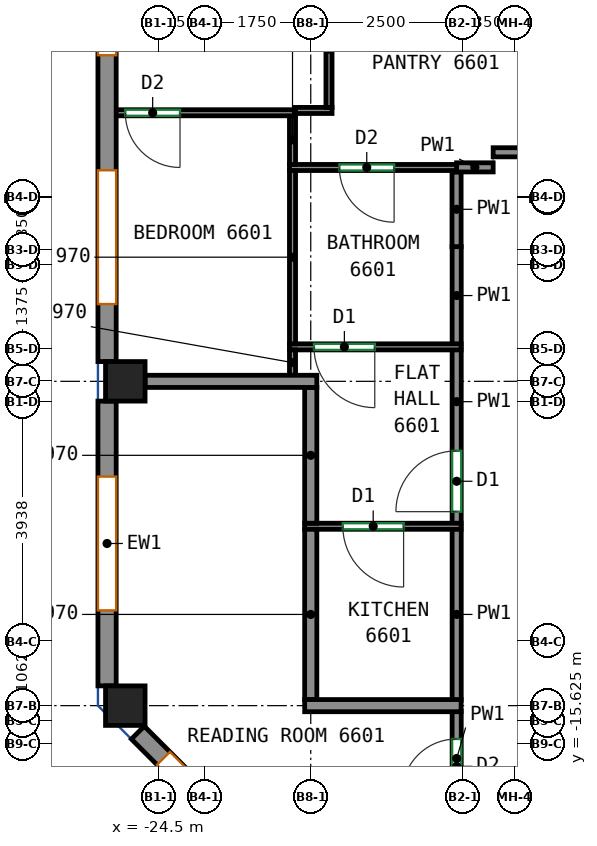
"""IFC4 building model, lengths in metres.
Left out: names, types, materials, properties, quantities, classifications, styles, units other than length and angle.
Written with IfcOpenShell. Run it as: python <this file> out.ifc"""

import sys

from ifc_helpers import new_model, si_unit, direction, frame, frame_2d, origin, origin_2d, place, context, subcontext, project, spatial, rectangle, extrude, source, transform, mapped, element, fill, save


model = new_model("IFC4")
c1 = context("Model", 3, precision=1e-05, world=origin(), true_north=direction((0.0, 1.0)))
c2 = subcontext(c1, "Body", "Model", "MODEL_VIEW")
j1 = project(units=[si_unit("LENGTHUNIT", "METRE"), si_unit("PLANEANGLEUNIT", "RADIAN")], contexts=[c1])
p1 = place(None, origin())
s1 = spatial("IfcSite", under=j1, at=p1, CompositionType="ELEMENT")
p2 = place(p1, origin())
s2 = spatial("IfcBuilding", under=s1, at=p2, CompositionType="ELEMENT")
p3 = place(p2, frame((0.0, 0.0, 270.4)))
s3 = spatial("IfcBuildingStorey", under=s2, at=p3, CompositionType="ELEMENT", Elevation=270.4)
m1 = source(origin(), c2, "Body", "SweptSolid", [
    extrude(rectangle(XDim=0.65, YDim=0.65, at=origin_2d()), origin(), (0.0, 0.0, 1.0), 3.12),
])
for number, where, z_axis, x_axis in (
    (1, (-25.05, -15.0, 0.0), (0.0, 0.0, 1.0), (1.0, 0.0, 0.0)),
    (2, (-25.05, -9.667, 0.0), (0.0, 0.0, 1.0), (1.0, 0.0, 0.0)),
):
    element("IfcColumn", number, at=place(p3, frame(where, z_axis=z_axis, x_axis=x_axis)), inside=s3, PredefinedType="COLUMN", context=c2, shape_type="MappedRepresentation", body=[
        mapped(m1, transform((0.0, 0.0, 0.0))),
    ])
m2 = source(origin(), c2, "Body", "SweptSolid", [
    extrude(rectangle(XDim=8.184, YDim=0.3, at=frame_2d((4.092, 0.0))), origin(), (0.0, 0.0, 1.0), 3.12),
])
p4 = place(p3, frame((-25.35, -1.158, 0.0), z_axis=(0.0, 0.0, 1.0), x_axis=(0.0, -1.0, 0.0)))
e3 = element("IfcWall", 3, at=p4, inside=s3, PredefinedType="SOLIDWALL", context=c2, shape_type="MappedRepresentation", body=[
    mapped(m2, transform((0.0, 0.0, 0.0))),
])
p5 = place(p4, frame((0.946, 0.0, 0.8)))
e4 = element("IfcOpeningElement", 4, at=p5, cuts=e3, PredefinedType="OPENING", context=c2, shape_type="SweptSolid", body=[
    extrude(rectangle(XDim=2.2, YDim=2.05, at=frame_2d((1.1, 1.025))), frame((0.0, 0.16, 0.0), z_axis=(0.0, -1.0, 0.0), x_axis=(1.0, 0.0, 0.0)), (0.0, 0.0, 1.0), 0.32),
])
p6 = place(p4, frame((5.038, 0.0, 0.8)))
e5 = element("IfcOpeningElement", 5, at=p6, cuts=e3, PredefinedType="OPENING", context=c2, shape_type="SweptSolid", body=[
    extrude(rectangle(XDim=2.2, YDim=2.05, at=frame_2d((1.1, 1.025))), frame((0.0, 0.16, 0.0), z_axis=(0.0, -1.0, 0.0), x_axis=(1.0, 0.0, 0.0)), (0.0, 0.0, 1.0), 0.32),
])
m3 = source(origin(), c2, "Body", "SweptSolid", [
    extrude(rectangle(XDim=4.683, YDim=0.3, at=frame_2d((2.342, 0.0))), origin(), (0.0, 0.0, 1.0), 3.12),
])
p7 = place(p3, frame((-25.35, -9.992, 0.0), z_axis=(0.0, 0.0, 1.0), x_axis=(0.0, -1.0, 0.0)))
e6 = element("IfcWall", 6, at=p7, inside=s3, PredefinedType="SOLIDWALL", context=c2, shape_type="MappedRepresentation", body=[
    mapped(m3, transform((0.0, 0.0, 0.0))),
])
p8 = place(p7, frame((1.242, 0.0, 0.8)))
e7 = element("IfcOpeningElement", 7, at=p8, cuts=e6, PredefinedType="OPENING", context=c2, shape_type="SweptSolid", body=[
    extrude(rectangle(XDim=2.2, YDim=2.05, at=frame_2d((1.1, 1.025))), frame((0.0, 0.16, 0.0), z_axis=(0.0, -1.0, 0.0), x_axis=(1.0, 0.0, 0.0)), (0.0, 0.0, 1.0), 0.32),
])
m4 = source(origin(), c2, "Body", "SweptSolid", [
    extrude(rectangle(XDim=3.394, YDim=0.3, at=frame_2d((1.697, 0.0))), origin(), (0.0, 0.0, 1.0), 3.12),
])
p9 = place(p3, frame((-24.844, -15.444, 0.0), z_axis=(0.0, 0.0, 1.0), x_axis=(0.707070815327, -0.707142745217, 0.0)))
e8 = element("IfcWall", 8, at=p9, inside=s3, PredefinedType="SOLIDWALL", context=c2, shape_type="MappedRepresentation", body=[
    mapped(m4, transform((0.0, 0.0, 0.0))),
])
p10 = place(p9, frame((0.597, 0.0, 0.8)))
e9 = element("IfcOpeningElement", 9, at=p10, cuts=e8, PredefinedType="OPENING", context=c2, shape_type="SweptSolid", body=[
    extrude(rectangle(XDim=2.2, YDim=2.05, at=frame_2d((1.1, 1.025))), frame((0.0, 0.16, 0.0), z_axis=(0.0, -1.0, 0.0), x_axis=(1.0, 0.0, 0.0)), (0.0, 0.0, 1.0), 0.32),
])
p11 = place(p3, frame((-19.6, -14.91, 0.0), z_axis=(0.0, 0.0, 1.0), x_axis=(0.0, 1.0, 0.0)))
e10 = element("IfcWall", 10, at=p11, inside=s3, PredefinedType="PARTITIONING", context=c2, shape_type="SweptSolid", body=[
    extrude(rectangle(XDim=2.82, YDim=0.15, at=frame_2d((1.41, 0.0))), origin(), (0.0, 0.0, 1.0), 3.12),
])
p12 = place(p3, frame((-19.6, -12.01, 0.0), z_axis=(0.0, 0.0, 1.0), x_axis=(0.0, 1.0, 0.0)))
e11 = element("IfcWall", 11, at=p12, inside=s3, PredefinedType="PARTITIONING", context=c2, shape_type="SweptSolid", body=[
    extrude(rectangle(XDim=2.87, YDim=0.15, at=frame_2d((1.435, 0.0))), origin(), (0.0, 0.0, 1.0), 3.12),
])
p13 = place(p12, frame((0.2, 0.0, 0.0)))
e12 = element("IfcOpeningElement", 12, at=p13, cuts=e11, PredefinedType="OPENING", context=c2, shape_type="SweptSolid", body=[
    extrude(rectangle(XDim=1.0, YDim=2.1, at=frame_2d((0.5, 1.05))), frame((0.0, 0.085, 0.0), z_axis=(0.0, -1.0, 0.0), x_axis=(1.0, 0.0, 0.0)), (0.0, 0.0, 1.0), 0.17),
])
p14 = place(p3, frame((-19.6, -9.06, 0.0), z_axis=(0.0, 0.0, 1.0), x_axis=(0.0, 1.0, 0.0)))
e13 = element("IfcWall", 13, at=p14, inside=s3, PredefinedType="PARTITIONING", context=c2, shape_type="SweptSolid", body=[
    extrude(rectangle(XDim=1.608, YDim=0.15, at=frame_2d((0.804, 0.0))), origin(), (0.0, 0.0, 1.0), 3.12),
])
p15 = place(p3, frame((-19.602, -7.452, 0.0), z_axis=(0.0, 0.0, 1.0), x_axis=(0.0, 1.0, 0.0)))
e14 = element("IfcWall", 14, at=p15, inside=s3, PredefinedType="PARTITIONING", context=c2, shape_type="SweptSolid", body=[
    extrude(rectangle(XDim=1.229, YDim=0.15, at=frame_2d((0.615, 0.0))), origin(), (0.0, 0.0, 1.0), 3.12),
])
p16 = place(p3, frame((-19.0, -6.148, 0.0), z_axis=(0.0, 0.0, 1.0), x_axis=(-1.0, 0.0, 0.0)))
e15 = element("IfcWall", 15, at=p16, inside=s3, PredefinedType="PARTITIONING", context=c2, shape_type="SweptSolid", body=[
    extrude(rectangle(XDim=0.602, YDim=0.15, at=frame_2d((0.301, 0.0))), origin(), (0.0, 0.0, 1.0), 3.12),
])
p17 = place(p3, frame((-19.0, -5.9, 0.0), z_axis=(0.0, 0.0, 1.0), x_axis=(1.0, 0.0, 0.0)))
e16 = element("IfcWall", 16, at=p17, inside=s3, PredefinedType="PARTITIONING", context=c2, shape_type="SweptSolid", body=[
    extrude(rectangle(XDim=25.655, YDim=0.15, at=frame_2d((12.828, 0.0))), origin(), (0.0, 0.0, 1.0), 3.12),
])
p18 = place(p17, frame((4.796, 0.0, 0.0)))
e17 = element("IfcOpeningElement", 17, at=p18, cuts=e16, PredefinedType="OPENING", context=c2, shape_type="SweptSolid", body=[
    extrude(rectangle(XDim=0.9, YDim=2.1, at=frame_2d((0.45, 1.05))), frame((0.0, 0.085, 0.0), z_axis=(0.0, -1.0, 0.0), x_axis=(1.0, 0.0, 0.0)), (0.0, 0.0, 1.0), 0.17),
])
p19 = place(p17, frame((21.535, 0.0, 0.0)))
e18 = element("IfcOpeningElement", 18, at=p19, cuts=e16, PredefinedType="OPENING", context=c2, shape_type="SweptSolid", body=[
    extrude(rectangle(XDim=0.9, YDim=2.1, at=frame_2d((0.45, 1.05))), frame((0.0, 0.085, 0.0), z_axis=(0.0, -1.0, 0.0), x_axis=(1.0, 0.0, 0.0)), (0.0, 0.0, 1.0), 0.17),
])
p20 = place(p3, frame((-19.6, -16.648, 0.0), z_axis=(0.0, 0.0, 1.0), x_axis=(0.0, 1.0, 0.0)))
e19 = element("IfcWall", 19, at=p20, inside=s3, PredefinedType="PARTITIONING", context=c2, shape_type="SweptSolid", body=[
    extrude(rectangle(XDim=1.558, YDim=0.15, at=frame_2d((0.779, 0.0))), origin(), (0.0, 0.0, 1.0), 3.12),
])
p21 = place(p20, frame((0.2, 0.0, 0.0)))
e20 = element("IfcOpeningElement", 20, at=p21, cuts=e19, PredefinedType="OPENING", context=c2, shape_type="SweptSolid", body=[
    extrude(rectangle(XDim=0.9, YDim=2.1, at=frame_2d((0.45, 1.05))), frame((0.0, 0.085, 0.0), z_axis=(0.0, -1.0, 0.0), x_axis=(1.0, 0.0, 0.0)), (0.0, 0.0, 1.0), 0.17),
])
p22 = place(p3, frame((-19.527, -12.05, 0.0), z_axis=(0.0, 0.0, 1.0), x_axis=(-1.0, 0.0, 0.0)))
e21 = element("IfcWall", 21, at=p22, inside=s3, PredefinedType="PARTITIONING", context=c2, shape_type="SweptSolid", body=[
    extrude(rectangle(XDim=2.573, YDim=0.1, at=frame_2d((1.287, 0.0))), origin(), (0.0, 0.0, 1.0), 3.12),
])
p23 = place(p22, frame((0.946, 0.0, 0.0)))
e22 = element("IfcOpeningElement", 22, at=p23, cuts=e21, PredefinedType="OPENING", context=c2, shape_type="SweptSolid", body=[
    extrude(rectangle(XDim=1.0, YDim=2.1, at=frame_2d((0.5, 1.05))), frame((0.0, 0.06, 0.0), z_axis=(0.0, -1.0, 0.0), x_axis=(1.0, 0.0, 0.0)), (0.0, 0.0, 1.0), 0.12),
])
p24 = place(p3, frame((-22.0, -14.9, 0.0), z_axis=(0.0, 0.0, 1.0), x_axis=(0.0, 1.0, 0.0)))
e23 = element("IfcWall", 23, at=p24, inside=s3, PredefinedType="PARTITIONING", context=c2, shape_type="SweptSolid", body=[
    extrude(rectangle(XDim=2.8, YDim=0.2, at=frame_2d((1.4, 0.0))), origin(), (0.0, 0.0, 1.0), 2.57),
])
p25 = place(p3, frame((-22.1, -15.0, 0.0), z_axis=(0.0, 0.0, 1.0), x_axis=(1.0, 0.0, 0.0)))
e24 = element("IfcWall", 24, at=p25, inside=s3, PredefinedType="PARTITIONING", context=c2, shape_type="SweptSolid", body=[
    extrude(rectangle(XDim=2.573, YDim=0.2, at=frame_2d((1.287, 0.0))), origin(), (0.0, 0.0, 1.0), 3.12),
])
p26 = place(p3, frame((-19.527, -9.1, 0.0), z_axis=(0.0, 0.0, 1.0), x_axis=(-1.0, 0.0, 0.0)))
e25 = element("IfcWall", 25, at=p26, inside=s3, PredefinedType="PARTITIONING", context=c2, shape_type="SweptSolid", body=[
    extrude(rectangle(XDim=2.823, YDim=0.1, at=frame_2d((1.412, 0.0))), origin(), (0.0, 0.0, 1.0), 3.12),
])
p27 = place(p26, frame((1.42, 0.0, 0.0)))
e26 = element("IfcOpeningElement", 26, at=p27, cuts=e25, PredefinedType="OPENING", context=c2, shape_type="SweptSolid", body=[
    extrude(rectangle(XDim=1.0, YDim=2.1, at=frame_2d((0.5, 1.05))), frame((0.0, 0.06, 0.0), z_axis=(0.0, -1.0, 0.0), x_axis=(1.0, 0.0, 0.0)), (0.0, 0.0, 1.0), 0.12),
])
p28 = place(p3, frame((-22.3, -9.567, 0.0), z_axis=(0.0, 0.0, 1.0), x_axis=(0.0, 1.0, 0.0)))
e27 = element("IfcWall", 27, at=p28, inside=s3, PredefinedType="PARTITIONING", context=c2, shape_type="SweptSolid", body=[
    extrude(rectangle(XDim=0.417, YDim=0.1, at=frame_2d((0.208, 0.0))), origin(), (0.0, 0.0, 1.0), 2.57),
])
p29 = place(p3, frame((-22.0, -12.0, 0.0), z_axis=(0.0, 0.0, 1.0), x_axis=(0.0, 1.0, 0.0)))
e28 = element("IfcWall", 28, at=p29, inside=s3, PredefinedType="PARTITIONING", context=c2, shape_type="SweptSolid", body=[
    extrude(rectangle(XDim=2.233, YDim=0.2, at=frame_2d((1.116, 0.0))), origin(), (0.0, 0.0, 1.0), 2.57),
])
p30 = place(p3, frame((-19.602, -6.15, 0.0), z_axis=(0.0, 0.0, 1.0), x_axis=(-1.0, 0.0, 0.0)))
e29 = element("IfcWall", 29, at=p30, inside=s3, PredefinedType="PARTITIONING", context=c2, shape_type="SweptSolid", body=[
    extrude(rectangle(XDim=2.748, YDim=0.1, at=frame_2d((1.374, 0.0))), origin(), (0.0, 0.0, 1.0), 3.12),
])
p31 = place(p30, frame((1.027, 0.0, 0.0)))
e30 = element("IfcOpeningElement", 30, at=p31, cuts=e29, PredefinedType="OPENING", context=c2, shape_type="SweptSolid", body=[
    extrude(rectangle(XDim=0.9, YDim=2.1, at=frame_2d((0.45, 1.05))), frame((0.0, 0.06, 0.0), z_axis=(0.0, -1.0, 0.0), x_axis=(1.0, 0.0, 0.0)), (0.0, 0.0, 1.0), 0.12),
])
p32 = place(p3, frame((-22.3, -9.05, 0.0), z_axis=(0.0, 0.0, 1.0), x_axis=(0.0, 1.0, 0.0)))
e31 = element("IfcWall", 31, at=p32, inside=s3, PredefinedType="PARTITIONING", context=c2, shape_type="SweptSolid", body=[
    extrude(rectangle(XDim=2.85, YDim=0.1, at=frame_2d((1.425, 0.0))), origin(), (0.0, 0.0, 1.0), 2.57),
])
p33 = place(p3, frame((-22.3, -6.1, 0.0), z_axis=(0.0, 0.0, 1.0), x_axis=(0.0, 1.0, 0.0)))
e32 = element("IfcWall", 32, at=p33, inside=s3, PredefinedType="PARTITIONING", context=c2, shape_type="SweptSolid", body=[
    extrude(rectangle(XDim=0.81, YDim=0.1, at=frame_2d((0.405, 0.0))), origin(), (0.0, 0.0, 1.0), 2.57),
])
p34 = place(p3, frame((-21.65, -5.212, 0.0), z_axis=(0.0, 0.0, 1.0), x_axis=(-1.0, 0.0, 0.0)))
e33 = element("IfcWall", 33, at=p34, inside=s3, PredefinedType="PARTITIONING", context=c2, shape_type="SweptSolid", body=[
    extrude(rectangle(XDim=0.602, YDim=0.1, at=frame_2d((0.301, 0.0))), origin(), (0.0, 0.0, 1.0), 3.12),
])
p35 = place(p3, frame((-21.7, -5.162, 0.0), z_axis=(0.0, 0.0, 1.0), x_axis=(0.0, 1.0, 0.0)))
e34 = element("IfcWall", 34, at=p35, inside=s3, PredefinedType="PARTITIONING", context=c2, shape_type="SweptSolid", body=[
    extrude(rectangle(XDim=1.912, YDim=0.1, at=frame_2d((0.956, 0.0))), origin(), (0.0, 0.0, 1.0), 2.57),
])
p36 = place(p3, frame((-22.252, -5.25, 0.0), z_axis=(0.0, 0.0, 1.0), x_axis=(-1.0, 0.0, 0.0)))
e35 = element("IfcWall", 35, at=p36, inside=s3, PredefinedType="PARTITIONING", context=c2, shape_type="SweptSolid", body=[
    extrude(rectangle(XDim=2.998, YDim=0.1, at=frame_2d((1.499, 0.0))), origin(), (0.0, 0.0, 1.0), 3.12),
])
p37 = place(p36, frame((1.898, 0.0, 0.0)))
e36 = element("IfcOpeningElement", 36, at=p37, cuts=e35, PredefinedType="OPENING", context=c2, shape_type="SweptSolid", body=[
    extrude(rectangle(XDim=0.9, YDim=2.1, at=frame_2d((0.45, 1.05))), frame((0.0, 0.06, 0.0), z_axis=(0.0, -1.0, 0.0), x_axis=(1.0, 0.0, 0.0)), (0.0, 0.0, 1.0), 0.12),
])
p38 = place(p3, frame((-24.725, -9.667, 0.0), z_axis=(0.0, 0.0, 1.0), x_axis=(1.0, 0.0, 0.0)))
e37 = element("IfcWall", 37, at=p38, inside=s3, PredefinedType="PARTITIONING", context=c2, shape_type="SweptSolid", body=[
    extrude(rectangle(XDim=2.825, YDim=0.2, at=frame_2d((1.413, 0.0))), origin(), (0.0, 0.0, 1.0), 3.12),
])
p39 = place(p5, origin())
e38 = element("IfcWindow", 38, at=p39, inside=s3, PartitioningType="SINGLE_PANEL", PredefinedType="WINDOW", context=c2, shape_type="SweptSolid", body=[
    extrude(rectangle(XDim=2.2, YDim=2.05, at=frame_2d((1.1, 1.025))), frame((0.0, 0.03, 0.0), z_axis=(0.0, -1.0, 0.0), x_axis=(1.0, 0.0, 0.0)), (0.0, 0.0, 1.0), 0.06),
])
fill(e4, e38)
p40 = place(p6, origin())
e39 = element("IfcWindow", 39, at=p40, inside=s3, PartitioningType="SINGLE_PANEL", PredefinedType="WINDOW", context=c2, shape_type="SweptSolid", body=[
    extrude(rectangle(XDim=2.2, YDim=2.05, at=frame_2d((1.1, 1.025))), frame((0.0, 0.03, 0.0), z_axis=(0.0, -1.0, 0.0), x_axis=(1.0, 0.0, 0.0)), (0.0, 0.0, 1.0), 0.06),
])
fill(e5, e39)
p41 = place(p8, origin())
e40 = element("IfcWindow", 40, at=p41, inside=s3, PartitioningType="SINGLE_PANEL", PredefinedType="WINDOW", context=c2, shape_type="SweptSolid", body=[
    extrude(rectangle(XDim=2.2, YDim=2.05, at=frame_2d((1.1, 1.025))), frame((0.0, 0.03, 0.0), z_axis=(0.0, -1.0, 0.0), x_axis=(1.0, 0.0, 0.0)), (0.0, 0.0, 1.0), 0.06),
])
fill(e7, e40)
p42 = place(p10, origin())
e41 = element("IfcWindow", 41, at=p42, inside=s3, PartitioningType="SINGLE_PANEL", PredefinedType="WINDOW", context=c2, shape_type="SweptSolid", body=[
    extrude(rectangle(XDim=2.2, YDim=2.05, at=frame_2d((1.1, 1.025))), frame((0.0, 0.03, 0.0), z_axis=(0.0, -1.0, 0.0), x_axis=(1.0, 0.0, 0.0)), (0.0, 0.0, 1.0), 0.06),
])
fill(e9, e41)
p43 = place(p21, origin())
e42 = element("IfcDoor", 42, at=p43, inside=s3, OperationType="SINGLE_SWING_LEFT", PredefinedType="DOOR", context=c2, shape_type="SweptSolid", body=[
    extrude(rectangle(XDim=0.9, YDim=2.1, at=frame_2d((0.45, 1.05))), frame((0.0, 0.025, 0.0), z_axis=(0.0, -1.0, 0.0), x_axis=(1.0, 0.0, 0.0)), (0.0, 0.0, 1.0), 0.05),
])
fill(e20, e42)
p44 = place(p23, origin())
e43 = element("IfcDoor", 43, at=p44, inside=s3, OperationType="SINGLE_SWING_LEFT", PredefinedType="DOOR", context=c2, shape_type="SweptSolid", body=[
    extrude(rectangle(XDim=1.0, YDim=2.1, at=frame_2d((0.5, 1.05))), frame((0.0, 0.025, 0.0), z_axis=(0.0, -1.0, 0.0), x_axis=(1.0, 0.0, 0.0)), (0.0, 0.0, 1.0), 0.05),
])
fill(e22, e43)
p45 = place(p13, origin())
e44 = element("IfcDoor", 44, at=p45, inside=s3, OperationType="SINGLE_SWING_LEFT", PredefinedType="DOOR", context=c2, shape_type="SweptSolid", body=[
    extrude(rectangle(XDim=1.0, YDim=2.1, at=frame_2d((0.5, 1.05))), frame((0.0, 0.025, 0.0), z_axis=(0.0, -1.0, 0.0), x_axis=(1.0, 0.0, 0.0)), (0.0, 0.0, 1.0), 0.05),
])
fill(e12, e44)
p46 = place(p27, origin())
e45 = element("IfcDoor", 45, at=p46, inside=s3, OperationType="SINGLE_SWING_LEFT", PredefinedType="DOOR", context=c2, shape_type="SweptSolid", body=[
    extrude(rectangle(XDim=1.0, YDim=2.1, at=frame_2d((0.5, 1.05))), frame((0.0, 0.025, 0.0), z_axis=(0.0, -1.0, 0.0), x_axis=(1.0, 0.0, 0.0)), (0.0, 0.0, 1.0), 0.05),
])
fill(e26, e45)
p47 = place(p31, origin())
e46 = element("IfcDoor", 46, at=p47, inside=s3, OperationType="SINGLE_SWING_LEFT", PredefinedType="DOOR", context=c2, shape_type="SweptSolid", body=[
    extrude(rectangle(XDim=0.9, YDim=2.1, at=frame_2d((0.45, 1.05))), frame((0.0, 0.025, 0.0), z_axis=(0.0, -1.0, 0.0), x_axis=(1.0, 0.0, 0.0)), (0.0, 0.0, 1.0), 0.05),
])
fill(e30, e46)
p48 = place(p37, origin())
e47 = element("IfcDoor", 47, at=p48, inside=s3, OperationType="SINGLE_SWING_LEFT", PredefinedType="DOOR", context=c2, shape_type="SweptSolid", body=[
    extrude(rectangle(XDim=0.9, YDim=2.1, at=frame_2d((0.45, 1.05))), frame((0.0, 0.025, 0.0), z_axis=(0.0, -1.0, 0.0), x_axis=(1.0, 0.0, 0.0)), (0.0, 0.0, 1.0), 0.05),
])
fill(e36, e47)
save(model, sys.argv[1])
